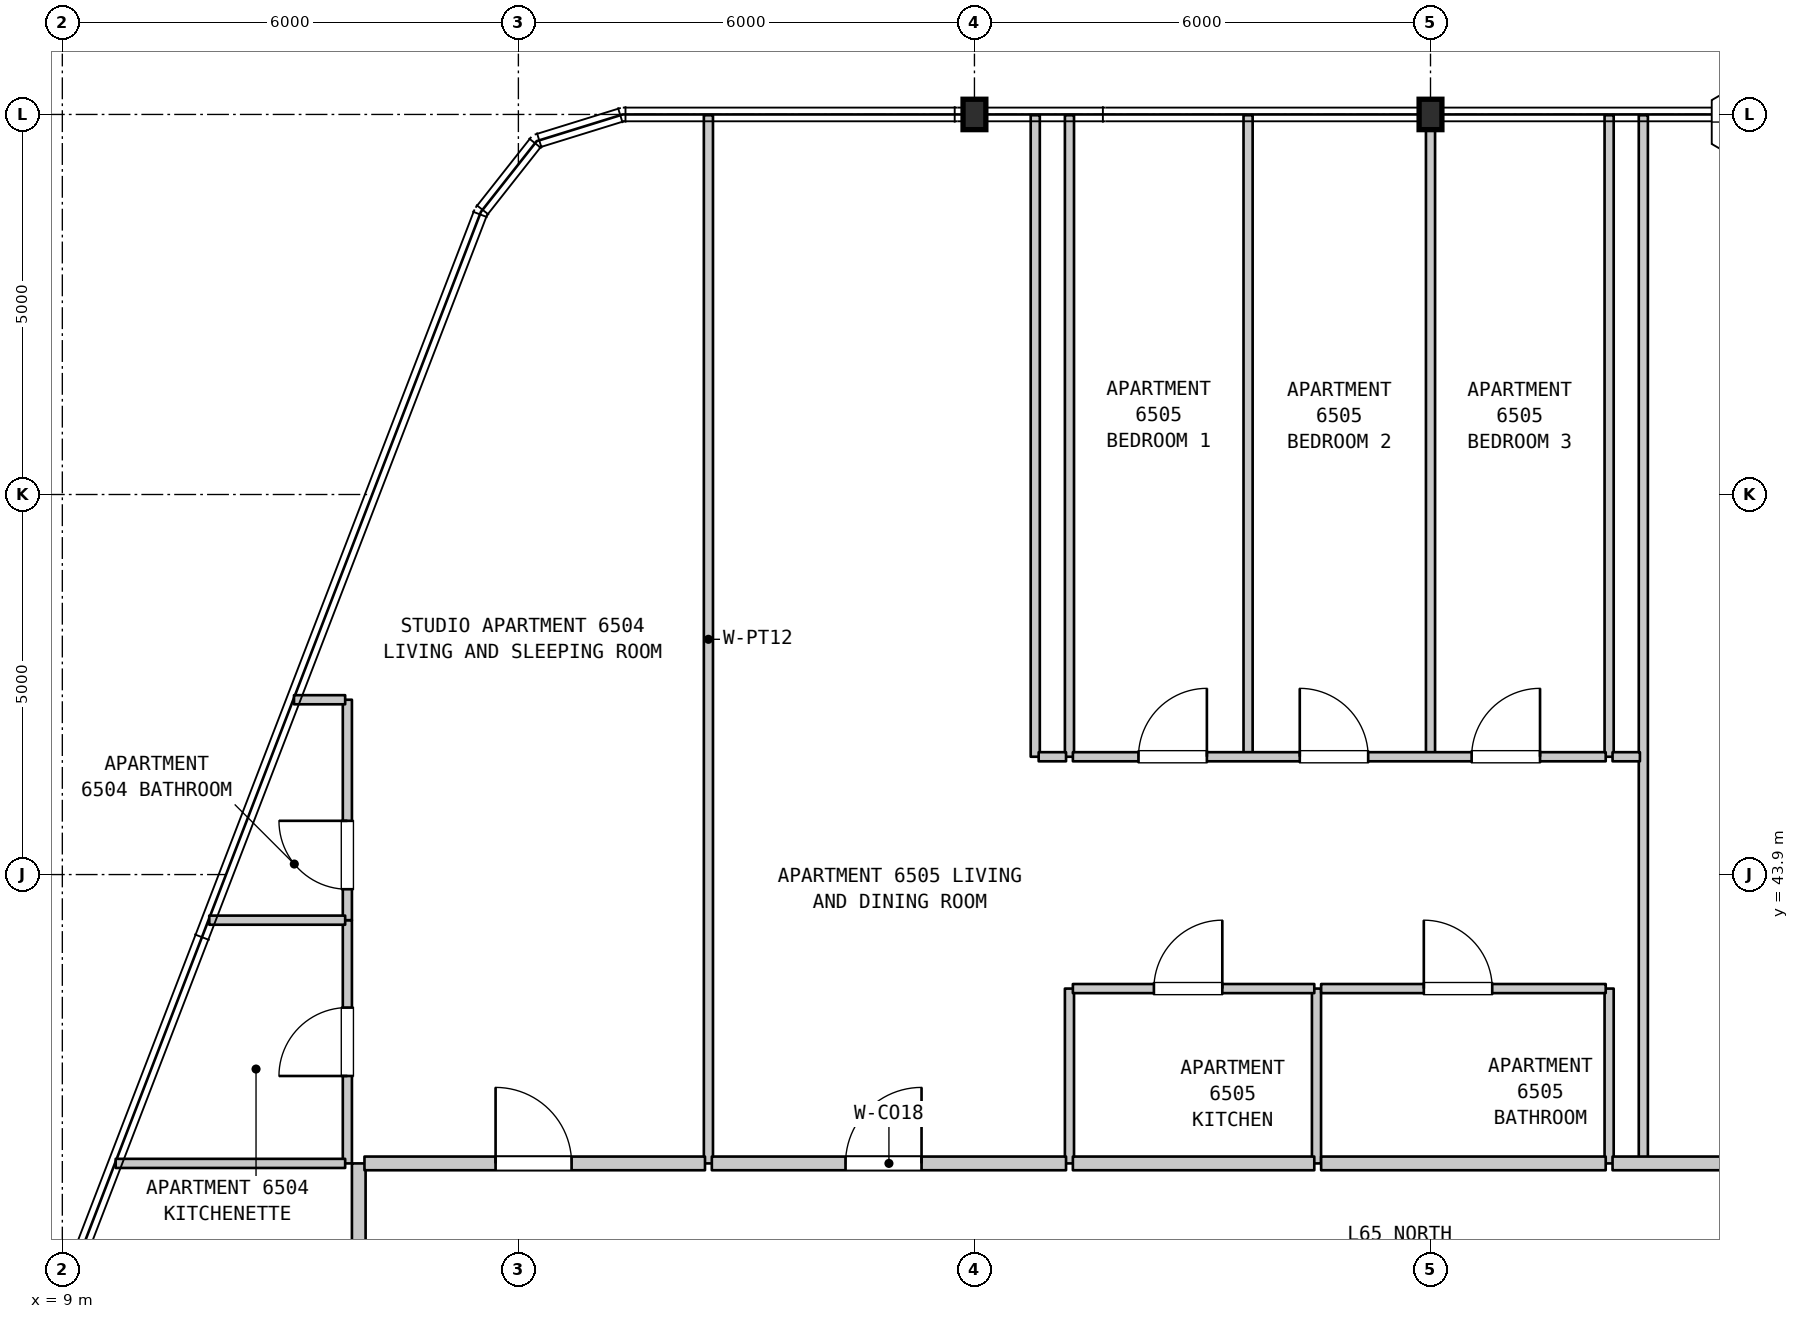
"""IFC4 building model, lengths in metres.
Left out: names, types, materials, properties, quantities, classifications, styles, units other than length and angle.
Written with IfcOpenShell. Run it as: python <this file> out.ifc"""

import sys

from ifc_helpers import new_model, si_unit, direction, frame, frame_2d, origin, origin_2d, place, context, subcontext, project, spatial, rectangle, i_section, extrude, element, fill, save


model = new_model("IFC4")
c1 = context("Model", 3, precision=1e-05, world=origin(), true_north=direction((0.0, 1.0)))
c2 = subcontext(c1, "Body", "Model", "MODEL_VIEW")
j1 = project(units=[si_unit("LENGTHUNIT", "METRE"), si_unit("PLANEANGLEUNIT", "RADIAN")], contexts=[c1])
p1 = place(None, origin())
s1 = spatial("IfcSite", under=j1, at=p1, CompositionType="ELEMENT")
p2 = place(p1, origin())
s2 = spatial("IfcBuilding", under=s1, at=p2, CompositionType="ELEMENT")
p3 = place(p2, frame((0.0, 0.0, 262.1)))
s3 = spatial("IfcBuildingStorey", under=s2, at=p3, CompositionType="ELEMENT", Elevation=262.1)
for number, where, z_axis, x_axis in (
    (1, (21.0, 53.9, 0.0), (0.0, 0.0, 1.0), (1.0, 0.0, 0.0)),
    (2, (27.0, 53.9, 0.0), (0.0, 0.0, 1.0), (1.0, 0.0, 0.0)),
):
    element("IfcColumn", number, at=place(p3, frame(where, z_axis=z_axis, x_axis=x_axis)), inside=s3, PredefinedType="COLUMN", context=c2, shape_type="SweptSolid", body=[
        extrude(i_section(OverallWidth=0.3, OverallDepth=0.4, WebThickness=0.013, FlangeThickness=0.024, FilletRadius=0.027, at=origin_2d()), origin(), (0.0, 0.0, 1.0), 3.7),
    ])
p4 = place(p3, frame((12.75, 40.1, 0.0), z_axis=(0.0, 0.0, 1.0), x_axis=(0.0, 1.0, 0.0)))
e3 = element("IfcWall", 3, at=p4, inside=s3, PredefinedType="PARTITIONING", context=c2, shape_type="SweptSolid", body=[
    extrude(rectangle(XDim=3.2, YDim=0.12, at=frame_2d((1.6, 0.0))), origin(), (0.0, 0.0, 1.0), 3.39),
])
p5 = place(p4, frame((1.15, 0.0, 0.0)))
e4 = element("IfcOpeningElement", 4, at=p5, cuts=e3, PredefinedType="OPENING", context=c2, shape_type="SweptSolid", body=[
    extrude(rectangle(XDim=0.9, YDim=2.15, at=frame_2d((0.45, 1.075))), frame((0.0, 0.07, 0.0), z_axis=(0.0, -1.0, 0.0), x_axis=(1.0, 0.0, 0.0)), (0.0, 0.0, 1.0), 0.14),
])
p6 = place(p3, frame((12.75, 43.3, 0.0), z_axis=(0.0, 0.0, 1.0), x_axis=(0.0, 1.0, 0.0)))
e5 = element("IfcWall", 5, at=p6, inside=s3, PredefinedType="PARTITIONING", context=c2, shape_type="SweptSolid", body=[
    extrude(rectangle(XDim=2.9, YDim=0.12, at=frame_2d((1.45, 0.0))), origin(), (0.0, 0.0, 1.0), 3.39),
])
p7 = place(p6, frame((0.407, 0.0, 0.0)))
e6 = element("IfcOpeningElement", 6, at=p7, cuts=e5, PredefinedType="OPENING", context=c2, shape_type="SweptSolid", body=[
    extrude(rectangle(XDim=0.9, YDim=2.1, at=frame_2d((0.45, 1.05))), frame((0.0, 0.07, 0.0), z_axis=(0.0, -1.0, 0.0), x_axis=(1.0, 0.0, 0.0)), (0.0, 0.0, 1.0), 0.14),
])
p8 = place(p3, frame((12.9, 37.222, 0.0), z_axis=(0.0, 0.0, 1.0), x_axis=(0.0, 1.0, 0.0)))
e7 = element("IfcWall", 7, at=p8, inside=s3, PredefinedType="STANDARD", context=c2, shape_type="SweptSolid", body=[
    extrude(rectangle(XDim=2.878, YDim=0.18, at=frame_2d((1.439, 0.0))), origin(), (0.0, 0.0, 1.0), 3.39),
])
p9 = place(p8, frame((0.864, 0.0, 0.0)))
e8 = element("IfcOpeningElement", 8, at=p9, cuts=e7, PredefinedType="OPENING", context=c2, shape_type="SweptSolid", body=[
    extrude(rectangle(XDim=1.0, YDim=2.15, at=frame_2d((0.5, 1.075))), frame((0.0, 0.1, 0.0), z_axis=(0.0, -1.0, 0.0), x_axis=(1.0, 0.0, 0.0)), (0.0, 0.0, 1.0), 0.2),
])
p10 = place(p3, frame((17.5, 40.1, 0.0), z_axis=(0.0, 0.0, 1.0), x_axis=(0.0, 1.0, 0.0)))
e9 = element("IfcWall", 9, at=p10, inside=s3, PredefinedType="PARTITIONING", context=c2, shape_type="SweptSolid", body=[
    extrude(rectangle(XDim=13.79, YDim=0.12, at=frame_2d((6.895, 0.0))), origin(), (0.0, 0.0, 1.0), 3.39),
])
p11 = place(p3, frame((21.8, 45.45, 0.0), z_axis=(0.0, 0.0, 1.0), x_axis=(0.0, 1.0, 0.0)))
e10 = element("IfcWall", 10, at=p11, inside=s3, PredefinedType="PARTITIONING", context=c2, shape_type="SweptSolid", body=[
    extrude(rectangle(XDim=8.44, YDim=0.12, at=frame_2d((4.22, 0.0))), origin(), (0.0, 0.0, 1.0), 3.39),
])
p12 = place(p3, frame((22.25, 40.1, 0.0), z_axis=(0.0, 0.0, 1.0), x_axis=(0.0, 1.0, 0.0)))
e11 = element("IfcWall", 11, at=p12, inside=s3, PredefinedType="PARTITIONING", context=c2, shape_type="SweptSolid", body=[
    extrude(rectangle(XDim=2.3, YDim=0.12, at=frame_2d((1.15, 0.0))), origin(), (0.0, 0.0, 1.0), 3.39),
])
for number, where, z_axis, x_axis in (
    (12, (22.25, 45.45, 0.0), (0.0, 0.0, 1.0), (0.0, 1.0, 0.0)),
    (13, (24.6, 45.45, 0.0), (0.0, 0.0, 1.0), (0.0, 1.0, 0.0)),
):
    element("IfcWall", number, at=place(p3, frame(where, z_axis=z_axis, x_axis=x_axis)), inside=s3, PredefinedType="PARTITIONING", context=c2, shape_type="SweptSolid", body=[
        extrude(rectangle(XDim=8.44, YDim=0.12, at=frame_2d((4.22, 0.0))), origin(), (0.0, 0.0, 1.0), 3.39),
    ])
p13 = place(p3, frame((25.5, 40.1, 0.0), z_axis=(0.0, 0.0, 1.0), x_axis=(0.0, 1.0, 0.0)))
e14 = element("IfcWall", 14, at=p13, inside=s3, PredefinedType="PARTITIONING", context=c2, shape_type="SweptSolid", body=[
    extrude(rectangle(XDim=2.3, YDim=0.12, at=frame_2d((1.15, 0.0))), origin(), (0.0, 0.0, 1.0), 3.39),
])
p14 = place(p3, frame((27.0, 45.45, 0.0), z_axis=(0.0, 0.0, 1.0), x_axis=(0.0, 1.0, 0.0)))
e15 = element("IfcWall", 15, at=p14, inside=s3, PredefinedType="PARTITIONING", context=c2, shape_type="SweptSolid", body=[
    extrude(rectangle(XDim=8.44, YDim=0.12, at=frame_2d((4.22, 0.0))), origin(), (0.0, 0.0, 1.0), 3.15),
])
p15 = place(p3, frame((29.35, 40.1, 0.0), z_axis=(0.0, 0.0, 1.0), x_axis=(0.0, 1.0, 0.0)))
e16 = element("IfcWall", 16, at=p15, inside=s3, PredefinedType="PARTITIONING", context=c2, shape_type="SweptSolid", body=[
    extrude(rectangle(XDim=2.3, YDim=0.12, at=frame_2d((1.15, 0.0))), origin(), (0.0, 0.0, 1.0), 3.39),
])
p16 = place(p3, frame((29.35, 45.45, 0.0), z_axis=(0.0, 0.0, 1.0), x_axis=(0.0, 1.0, 0.0)))
e17 = element("IfcWall", 17, at=p16, inside=s3, PredefinedType="PARTITIONING", context=c2, shape_type="SweptSolid", body=[
    extrude(rectangle(XDim=8.44, YDim=0.12, at=frame_2d((4.22, 0.0))), origin(), (0.0, 0.0, 1.0), 3.39),
])
p17 = place(p3, frame((29.8, 40.1, 0.0), z_axis=(0.0, 0.0, 1.0), x_axis=(0.0, 1.0, 0.0)))
e18 = element("IfcWall", 18, at=p17, inside=s3, PredefinedType="PARTITIONING", context=c2, shape_type="SweptSolid", body=[
    extrude(rectangle(XDim=13.79, YDim=0.12, at=frame_2d((6.895, 0.0))), origin(), (0.0, 0.0, 1.0), 3.39),
])
p18 = place(p3, frame((9.702, 40.1, 0.0), z_axis=(0.0, 0.0, 1.0), x_axis=(1.0, 0.0, 0.0)))
e19 = element("IfcWall", 19, at=p18, inside=s3, PredefinedType="PARTITIONING", context=c2, shape_type="SweptSolid", body=[
    extrude(rectangle(XDim=3.019, YDim=0.12, at=frame_2d((1.51, 0.0))), origin(), (0.0, 0.0, 1.0), 3.39),
])
p19 = place(p3, frame((12.975, 40.1, 0.0), z_axis=(0.0, 0.0, 1.0), x_axis=(1.0, 0.0, 0.0)))
e20 = element("IfcWall", 20, at=p19, inside=s3, PredefinedType="STANDARD", context=c2, shape_type="SweptSolid", body=[
    extrude(rectangle(XDim=4.48, YDim=0.18, at=frame_2d((2.24, 0.0))), origin(), (0.0, 0.0, 1.0), 3.39),
])
p20 = place(p19, frame((1.725, 0.0, 0.0)))
e21 = element("IfcOpeningElement", 21, at=p20, cuts=e20, PredefinedType="OPENING", context=c2, shape_type="SweptSolid", body=[
    extrude(rectangle(XDim=1.0, YDim=2.15, at=frame_2d((0.5, 1.075))), frame((0.0, 0.1, 0.0), z_axis=(0.0, -1.0, 0.0), x_axis=(1.0, 0.0, 0.0)), (0.0, 0.0, 1.0), 0.2),
])
p21 = place(p3, frame((17.545, 40.1, 0.0), z_axis=(0.0, 0.0, 1.0), x_axis=(1.0, 0.0, 0.0)))
e22 = element("IfcWall", 22, at=p21, inside=s3, PredefinedType="STANDARD", context=c2, shape_type="SweptSolid", body=[
    extrude(rectangle(XDim=4.66, YDim=0.18, at=frame_2d((2.33, 0.0))), origin(), (0.0, 0.0, 1.0), 3.39),
])
p22 = place(p21, frame((1.759, 0.0, 0.0)))
e23 = element("IfcOpeningElement", 23, at=p22, cuts=e22, PredefinedType="OPENING", context=c2, shape_type="SweptSolid", body=[
    extrude(rectangle(XDim=1.0, YDim=2.15, at=frame_2d((0.5, 1.075))), frame((0.0, 0.1, 0.0), z_axis=(0.0, -1.0, 0.0), x_axis=(1.0, 0.0, 0.0)), (0.0, 0.0, 1.0), 0.2),
])
p23 = place(p3, frame((22.295, 40.1, 0.0), z_axis=(0.0, 0.0, 1.0), x_axis=(1.0, 0.0, 0.0)))
e24 = element("IfcWall", 24, at=p23, inside=s3, PredefinedType="STANDARD", context=c2, shape_type="SweptSolid", body=[
    extrude(rectangle(XDim=3.176, YDim=0.18, at=frame_2d((1.588, 0.0))), origin(), (0.0, 0.0, 1.0), 3.39),
])
p24 = place(p3, frame((25.561, 40.1, 0.0), z_axis=(0.0, 0.0, 1.0), x_axis=(1.0, 0.0, 0.0)))
e25 = element("IfcWall", 25, at=p24, inside=s3, PredefinedType="STANDARD", context=c2, shape_type="SweptSolid", body=[
    extrude(rectangle(XDim=3.744, YDim=0.18, at=frame_2d((1.872, 0.0))), origin(), (0.0, 0.0, 1.0), 3.39),
])
p25 = place(p3, frame((29.395, 40.1, 0.0), z_axis=(0.0, 0.0, 1.0), x_axis=(1.0, 0.0, 0.0)))
e26 = element("IfcWall", 26, at=p25, inside=s3, PredefinedType="STANDARD", context=c2, shape_type="SweptSolid", body=[
    extrude(rectangle(XDim=3.53, YDim=0.18, at=frame_2d((1.765, 0.0))), origin(), (0.0, 0.0, 1.0), 3.39),
])
p26 = place(p25, frame((1.48, 0.0, 0.0)))
e27 = element("IfcOpeningElement", 27, at=p26, cuts=e26, PredefinedType="OPENING", context=c2, shape_type="SweptSolid", body=[
    extrude(rectangle(XDim=1.0, YDim=2.15, at=frame_2d((0.5, 1.075))), frame((0.0, 0.1, 0.0), z_axis=(0.0, -1.0, 0.0), x_axis=(1.0, 0.0, 0.0)), (0.0, 0.0, 1.0), 0.2),
])
p27 = place(p3, frame((22.295, 42.4, 0.0), z_axis=(0.0, 0.0, 1.0), x_axis=(1.0, 0.0, 0.0)))
e28 = element("IfcWall", 28, at=p27, inside=s3, PredefinedType="PARTITIONING", context=c2, shape_type="SweptSolid", body=[
    extrude(rectangle(XDim=3.176, YDim=0.12, at=frame_2d((1.588, 0.0))), origin(), (0.0, 0.0, 1.0), 3.39),
])
p28 = place(p27, frame((1.066, 0.0, 0.0)))
e29 = element("IfcOpeningElement", 29, at=p28, cuts=e28, PredefinedType="OPENING", context=c2, shape_type="SweptSolid", body=[
    extrude(rectangle(XDim=0.9, YDim=2.15, at=frame_2d((0.45, 1.075))), frame((0.0, 0.07, 0.0), z_axis=(0.0, -1.0, 0.0), x_axis=(1.0, 0.0, 0.0)), (0.0, 0.0, 1.0), 0.14),
])
p29 = place(p3, frame((25.561, 42.4, 0.0), z_axis=(0.0, 0.0, 1.0), x_axis=(1.0, 0.0, 0.0)))
e30 = element("IfcWall", 30, at=p29, inside=s3, PredefinedType="PARTITIONING", context=c2, shape_type="SweptSolid", body=[
    extrude(rectangle(XDim=3.744, YDim=0.12, at=frame_2d((1.872, 0.0))), origin(), (0.0, 0.0, 1.0), 3.39),
])
p30 = place(p29, frame((1.351, 0.0, 0.0)))
e31 = element("IfcOpeningElement", 31, at=p30, cuts=e30, PredefinedType="OPENING", context=c2, shape_type="SweptSolid", body=[
    extrude(rectangle(XDim=0.9, YDim=2.1, at=frame_2d((0.45, 1.05))), frame((0.0, 0.07, 0.0), z_axis=(0.0, -1.0, 0.0), x_axis=(1.0, 0.0, 0.0)), (0.0, 0.0, 1.0), 0.14),
])
p31 = place(p3, frame((10.933, 43.3, 0.0), z_axis=(0.0, 0.0, 1.0), x_axis=(1.0, 0.0, 0.0)))
e32 = element("IfcWall", 32, at=p31, inside=s3, PredefinedType="PARTITIONING", context=c2, shape_type="SweptSolid", body=[
    extrude(rectangle(XDim=1.788, YDim=0.12, at=frame_2d((0.894, 0.0))), origin(), (0.0, 0.0, 1.0), 3.39),
])
p32 = place(p3, frame((21.845, 45.45, 0.0), z_axis=(0.0, 0.0, 1.0), x_axis=(1.0, 0.0, 0.0)))
e33 = element("IfcWall", 33, at=p32, inside=s3, PredefinedType="PARTITIONING", context=c2, shape_type="SweptSolid", body=[
    extrude(rectangle(XDim=0.36, YDim=0.12, at=frame_2d((0.18, 0.0))), origin(), (0.0, 0.0, 1.0), 3.39),
])
p33 = place(p3, frame((22.295, 45.45, 0.0), z_axis=(0.0, 0.0, 1.0), x_axis=(1.0, 0.0, 0.0)))
e34 = element("IfcWall", 34, at=p33, inside=s3, PredefinedType="PARTITIONING", context=c2, shape_type="SweptSolid", body=[
    extrude(rectangle(XDim=7.01, YDim=0.12, at=frame_2d((3.505, 0.0))), origin(), (0.0, 0.0, 1.0), 3.39),
])
p34 = place(p33, frame((0.863, 0.0, 0.0)))
e35 = element("IfcOpeningElement", 35, at=p34, cuts=e34, PredefinedType="OPENING", context=c2, shape_type="SweptSolid", body=[
    extrude(rectangle(XDim=0.9, YDim=2.15, at=frame_2d((0.45, 1.075))), frame((0.0, 0.07, 0.0), z_axis=(0.0, -1.0, 0.0), x_axis=(1.0, 0.0, 0.0)), (0.0, 0.0, 1.0), 0.14),
])
p35 = place(p33, frame((2.985, 0.0, 0.0)))
e36 = element("IfcOpeningElement", 36, at=p35, cuts=e34, PredefinedType="OPENING", context=c2, shape_type="SweptSolid", body=[
    extrude(rectangle(XDim=0.9, YDim=2.15, at=frame_2d((0.45, 1.075))), frame((0.0, 0.07, 0.0), z_axis=(0.0, -1.0, 0.0), x_axis=(1.0, 0.0, 0.0)), (0.0, 0.0, 1.0), 0.14),
])
p36 = place(p33, frame((5.246, 0.0, 0.0)))
e37 = element("IfcOpeningElement", 37, at=p36, cuts=e34, PredefinedType="OPENING", context=c2, shape_type="SweptSolid", body=[
    extrude(rectangle(XDim=0.9, YDim=2.15, at=frame_2d((0.45, 1.075))), frame((0.0, 0.07, 0.0), z_axis=(0.0, -1.0, 0.0), x_axis=(1.0, 0.0, 0.0)), (0.0, 0.0, 1.0), 0.14),
])
p37 = place(p3, frame((29.395, 45.45, 0.0), z_axis=(0.0, 0.0, 1.0), x_axis=(1.0, 0.0, 0.0)))
e38 = element("IfcWall", 38, at=p37, inside=s3, PredefinedType="PARTITIONING", context=c2, shape_type="SweptSolid", body=[
    extrude(rectangle(XDim=0.36, YDim=0.12, at=frame_2d((0.18, 0.0))), origin(), (0.0, 0.0, 1.0), 3.39),
])
p38 = place(p3, frame((12.048, 46.2, 0.0), z_axis=(0.0, 0.0, 1.0), x_axis=(1.0, 0.0, 0.0)))
e39 = element("IfcWall", 39, at=p38, inside=s3, PredefinedType="PARTITIONING", context=c2, shape_type="SweptSolid", body=[
    extrude(rectangle(XDim=0.673, YDim=0.12, at=frame_2d((0.336, 0.0))), origin(), (0.0, 0.0, 1.0), 3.39),
])
p39 = place(p5, origin())
e40 = element("IfcDoor", 40, at=p39, inside=s3, OperationType="SINGLE_SWING_LEFT", PredefinedType="DOOR", context=c2, shape_type="SweptSolid", body=[
    extrude(rectangle(XDim=0.9, YDim=2.15, at=frame_2d((0.45, 1.075))), frame((0.0, 0.025, 0.0), z_axis=(0.0, -1.0, 0.0), x_axis=(1.0, 0.0, 0.0)), (0.0, 0.0, 1.0), 0.05),
])
fill(e4, e40)
p40 = place(p7, origin())
e41 = element("IfcDoor", 41, at=p40, inside=s3, OperationType="SINGLE_SWING_RIGHT", PredefinedType="DOOR", context=c2, shape_type="SweptSolid", body=[
    extrude(rectangle(XDim=0.9, YDim=2.1, at=frame_2d((0.45, 1.05))), frame((0.0, 0.025, 0.0), z_axis=(0.0, -1.0, 0.0), x_axis=(1.0, 0.0, 0.0)), (0.0, 0.0, 1.0), 0.05),
])
fill(e6, e41)
p41 = place(p20, origin())
e42 = element("IfcDoor", 42, at=p41, inside=s3, OperationType="SINGLE_SWING_LEFT", PredefinedType="DOOR", context=c2, shape_type="SweptSolid", body=[
    extrude(rectangle(XDim=1.0, YDim=2.15, at=frame_2d((0.5, 1.075))), frame((0.0, 0.025, 0.0), z_axis=(0.0, -1.0, 0.0), x_axis=(1.0, 0.0, 0.0)), (0.0, 0.0, 1.0), 0.05),
])
fill(e21, e42)
p42 = place(p22, origin())
e43 = element("IfcDoor", 43, at=p42, inside=s3, OperationType="SINGLE_SWING_RIGHT", PredefinedType="DOOR", context=c2, shape_type="SweptSolid", body=[
    extrude(rectangle(XDim=1.0, YDim=2.15, at=frame_2d((0.5, 1.075))), frame((0.0, 0.025, 0.0), z_axis=(0.0, -1.0, 0.0), x_axis=(1.0, 0.0, 0.0)), (0.0, 0.0, 1.0), 0.05),
])
fill(e23, e43)
p43 = place(p28, origin())
e44 = element("IfcDoor", 44, at=p43, inside=s3, OperationType="SINGLE_SWING_RIGHT", PredefinedType="DOOR", context=c2, shape_type="SweptSolid", body=[
    extrude(rectangle(XDim=0.9, YDim=2.15, at=frame_2d((0.45, 1.075))), frame((0.0, 0.025, 0.0), z_axis=(0.0, -1.0, 0.0), x_axis=(1.0, 0.0, 0.0)), (0.0, 0.0, 1.0), 0.05),
])
fill(e29, e44)
p44 = place(p30, origin())
e45 = element("IfcDoor", 45, at=p44, inside=s3, OperationType="SINGLE_SWING_LEFT", PredefinedType="DOOR", context=c2, shape_type="SweptSolid", body=[
    extrude(rectangle(XDim=0.9, YDim=2.1, at=frame_2d((0.45, 1.05))), frame((0.0, 0.025, 0.0), z_axis=(0.0, -1.0, 0.0), x_axis=(1.0, 0.0, 0.0)), (0.0, 0.0, 1.0), 0.05),
])
fill(e31, e45)
p45 = place(p34, origin())
e46 = element("IfcDoor", 46, at=p45, inside=s3, OperationType="SINGLE_SWING_RIGHT", PredefinedType="DOOR", context=c2, shape_type="SweptSolid", body=[
    extrude(rectangle(XDim=0.9, YDim=2.15, at=frame_2d((0.45, 1.075))), frame((0.0, 0.025, 0.0), z_axis=(0.0, -1.0, 0.0), x_axis=(1.0, 0.0, 0.0)), (0.0, 0.0, 1.0), 0.05),
])
fill(e35, e46)
p46 = place(p35, origin())
e47 = element("IfcDoor", 47, at=p46, inside=s3, OperationType="SINGLE_SWING_LEFT", PredefinedType="DOOR", context=c2, shape_type="SweptSolid", body=[
    extrude(rectangle(XDim=0.9, YDim=2.15, at=frame_2d((0.45, 1.075))), frame((0.0, 0.025, 0.0), z_axis=(0.0, -1.0, 0.0), x_axis=(1.0, 0.0, 0.0)), (0.0, 0.0, 1.0), 0.05),
])
fill(e36, e47)
p47 = place(p36, origin())
e48 = element("IfcDoor", 48, at=p47, inside=s3, OperationType="SINGLE_SWING_RIGHT", PredefinedType="DOOR", context=c2, shape_type="SweptSolid", body=[
    extrude(rectangle(XDim=0.9, YDim=2.15, at=frame_2d((0.45, 1.075))), frame((0.0, 0.025, 0.0), z_axis=(0.0, -1.0, 0.0), x_axis=(1.0, 0.0, 0.0)), (0.0, 0.0, 1.0), 0.05),
])
fill(e37, e48)
save(model, sys.argv[1])
